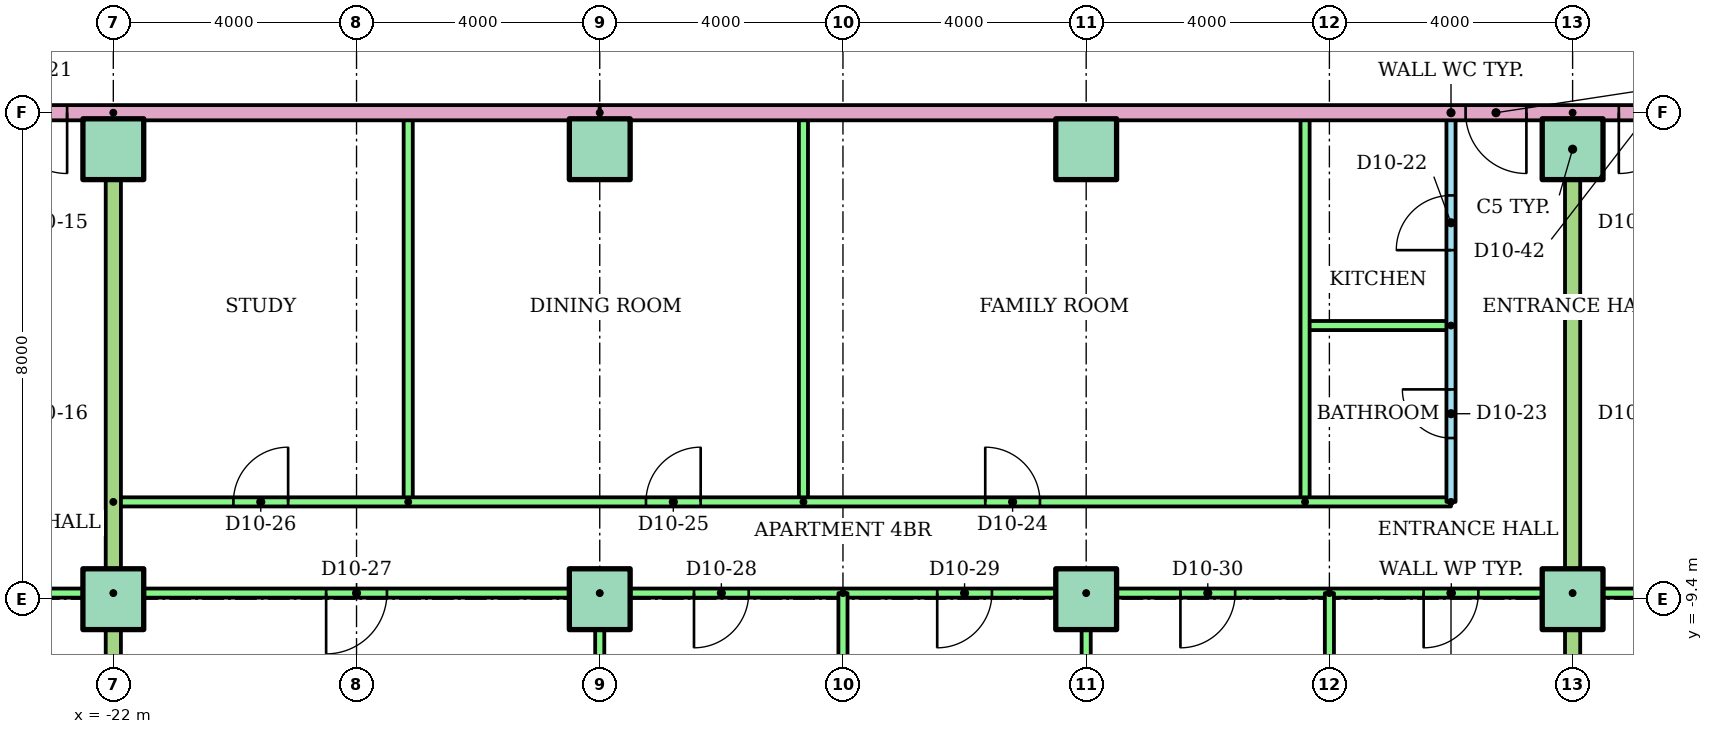
"""IFC4 building model, lengths in metres.
Left out: names, types, materials, properties, quantities, classifications, styles, units other than length and angle.
Written with IfcOpenShell. Run it as: python <this file> out.ifc"""

import sys

from ifc_helpers import new_model, si_unit, direction, frame, frame_2d, origin, origin_2d, place, context, subcontext, project, spatial, rectangle, extrude, element, fill, save


model = new_model("IFC4")
c1 = context("Model", 3, precision=1e-05, world=origin(), true_north=direction((0.0, 1.0)))
c2 = subcontext(c1, "Body", "Model", "MODEL_VIEW")
j1 = project(units=[si_unit("LENGTHUNIT", "METRE"), si_unit("PLANEANGLEUNIT", "RADIAN")], contexts=[c1])
p1 = place(None, origin())
s1 = spatial("IfcSite", under=j1, at=p1, CompositionType="ELEMENT")
p2 = place(p1, origin())
s2 = spatial("IfcBuilding", under=s1, at=p2, CompositionType="ELEMENT")
p3 = place(p2, frame((0.0, 0.0, 41.6)))
s3 = spatial("IfcBuildingStorey", under=s2, at=p3, CompositionType="ELEMENT", Elevation=41.6)
for number, where in (
    (1, (-22.0, -9.4, 0.0)),
    (2, (-14.0, -9.4, 0.0)),
    (3, (-6.0, -9.4, 0.0)),
    (4, (2.0, -9.4, 0.0)),
    (5, (-22.0, -2.0, 0.0)),
    (6, (-14.0, -2.0, 0.0)),
    (7, (-6.0, -2.0, 0.0)),
    (8, (2.0, -2.0, 0.0)),
):
    element("IfcColumn", number, at=place(p3, frame(where)), inside=s3, PredefinedType="COLUMN", context=c2, shape_type="SweptSolid", body=[
        extrude(rectangle(XDim=1.0, YDim=1.0, at=origin_2d()), origin(), (0.0, 0.0, 1.0), 3.2),
    ])
p4 = place(p3, frame((-22.0, -9.3, 0.0), z_axis=(0.0, 0.0, 1.0), x_axis=(-1.0, 0.0, 0.0)))
e9 = element("IfcWall", 9, at=p4, inside=s3, PredefinedType="PARTITIONING", context=c2, shape_type="SweptSolid", body=[
    extrude(rectangle(XDim=14.51, YDim=0.15, at=frame_2d((7.255, 0.0))), origin(), (0.0, 0.0, 1.0), 2.4),
])
p5 = place(p4, frame((11.6, 0.0, 0.0)))
e10 = element("IfcOpeningElement", 10, at=p5, cuts=e9, PredefinedType="OPENING", context=c2, shape_type="SweptSolid", body=[
    extrude(rectangle(XDim=0.9, YDim=2.1, at=frame_2d((0.45, 1.05))), frame((0.0, 0.085, 0.0), z_axis=(0.0, -1.0, 0.0), x_axis=(1.0, 0.0, 0.0)), (0.0, 0.0, 1.0), 0.17),
])
p6 = place(p4, frame((4.4, 0.0, 0.0)))
e11 = element("IfcOpeningElement", 11, at=p6, cuts=e9, PredefinedType="OPENING", context=c2, shape_type="SweptSolid", body=[
    extrude(rectangle(XDim=1.0, YDim=2.1, at=frame_2d((0.5, 1.05))), frame((0.0, 0.085, 0.0), z_axis=(0.0, -1.0, 0.0), x_axis=(1.0, 0.0, 0.0)), (0.0, 0.0, 1.0), 0.17),
])
p7 = place(p3, frame((0.0, -7.8, 0.0), z_axis=(0.0, 0.0, 1.0), x_axis=(0.0, 1.0, 0.0)))
e12 = element("IfcWall", 12, at=p7, inside=s3, PredefinedType="PARTITIONING", context=c2, shape_type="SweptSolid", body=[
    extrude(rectangle(XDim=6.4, YDim=0.15, at=frame_2d((3.2, 0.0))), origin(), (0.0, 0.0, 1.0), 2.4),
])
p8 = place(p7, frame((4.14, 0.0, 0.0)))
e13 = element("IfcOpeningElement", 13, at=p8, cuts=e12, PredefinedType="OPENING", context=c2, shape_type="SweptSolid", body=[
    extrude(rectangle(XDim=0.9, YDim=2.1, at=frame_2d((0.45, 1.05))), frame((0.0, 0.085, 0.0), z_axis=(0.0, -1.0, 0.0), x_axis=(1.0, 0.0, 0.0)), (0.0, 0.0, 1.0), 0.17),
])
p9 = place(p7, frame((1.05, 0.0, 0.0)))
e14 = element("IfcOpeningElement", 14, at=p9, cuts=e12, PredefinedType="OPENING", context=c2, shape_type="SweptSolid", body=[
    extrude(rectangle(XDim=0.8, YDim=2.1, at=frame_2d((0.4, 1.05))), frame((0.0, 0.085, 0.0), z_axis=(0.0, -1.0, 0.0), x_axis=(1.0, 0.0, 0.0)), (0.0, 0.0, 1.0), 0.17),
])
p10 = place(p3, frame((0.0, -4.9, 0.0), z_axis=(0.0, 0.0, 1.0), x_axis=(-1.0, 0.0, 0.0)))
e15 = element("IfcWall", 15, at=p10, inside=s3, PredefinedType="PARTITIONING", context=c2, shape_type="SweptSolid", body=[
    extrude(rectangle(XDim=2.4, YDim=0.15, at=frame_2d((1.2, 0.0))), origin(), (0.0, 0.0, 1.0), 2.4),
])
for number, where, z_axis, x_axis in (
    (16, (-2.4, -7.8, 0.0), (0.0, 0.0, 1.0), (0.0, 1.0, 0.0)),
    (17, (-10.65, -7.8, 0.0), (0.0, 0.0, 1.0), (0.0, 1.0, 0.0)),
    (18, (-17.15, -7.8, 0.0), (0.0, 0.0, 1.0), (0.0, 1.0, 0.0)),
):
    element("IfcWall", number, at=place(p3, frame(where, z_axis=z_axis, x_axis=x_axis)), inside=s3, PredefinedType="PARTITIONING", context=c2, shape_type="SweptSolid", body=[
        extrude(rectangle(XDim=6.4, YDim=0.15, at=frame_2d((3.2, 0.0))), origin(), (0.0, 0.0, 1.0), 2.4),
    ])
p11 = place(p3, frame((-22.0, -7.8, 0.0)))
e19 = element("IfcWall", 19, at=p11, inside=s3, PredefinedType="PARTITIONING", context=c2, shape_type="SweptSolid", body=[
    extrude(rectangle(XDim=22.0, YDim=0.15, at=frame_2d((11.0, 0.0))), origin(), (0.0, 0.0, 1.0), 2.4),
])
p12 = place(p11, frame((14.34, 0.0, 0.0)))
e20 = element("IfcOpeningElement", 20, at=p12, cuts=e19, PredefinedType="OPENING", context=c2, shape_type="SweptSolid", body=[
    extrude(rectangle(XDim=0.9, YDim=2.1, at=frame_2d((0.45, 1.05))), frame((0.0, 0.085, 0.0), z_axis=(0.0, -1.0, 0.0), x_axis=(1.0, 0.0, 0.0)), (0.0, 0.0, 1.0), 0.17),
])
p13 = place(p11, frame((8.76, 0.0, 0.0)))
e21 = element("IfcOpeningElement", 21, at=p13, cuts=e19, PredefinedType="OPENING", context=c2, shape_type="SweptSolid", body=[
    extrude(rectangle(XDim=0.9, YDim=2.1, at=frame_2d((0.45, 1.05))), frame((0.0, 0.085, 0.0), z_axis=(0.0, -1.0, 0.0), x_axis=(1.0, 0.0, 0.0)), (0.0, 0.0, 1.0), 0.17),
])
p14 = place(p11, frame((1.975, 0.0, 0.0)))
e22 = element("IfcOpeningElement", 22, at=p14, cuts=e19, PredefinedType="OPENING", context=c2, shape_type="SweptSolid", body=[
    extrude(rectangle(XDim=0.9, YDim=2.1, at=frame_2d((0.45, 1.05))), frame((0.0, 0.085, 0.0), z_axis=(0.0, -1.0, 0.0), x_axis=(1.0, 0.0, 0.0)), (0.0, 0.0, 1.0), 0.17),
])
p15 = place(p3, frame((2.0, -9.3, 0.0), z_axis=(0.0, 0.0, 1.0), x_axis=(-1.0, 0.0, 0.0)))
e23 = element("IfcWall", 23, at=p15, inside=s3, PredefinedType="PARTITIONING", context=c2, shape_type="SweptSolid", body=[
    extrude(rectangle(XDim=24.0, YDim=0.15, at=frame_2d((12.0, 0.0))), origin(), (0.0, 0.0, 1.0), 2.4),
])
p16 = place(p15, frame((19.5, 0.0, 0.0)))
e24 = element("IfcOpeningElement", 24, at=p16, cuts=e23, PredefinedType="OPENING", context=c2, shape_type="SweptSolid", body=[
    extrude(rectangle(XDim=1.0, YDim=2.1, at=frame_2d((0.5, 1.05))), frame((0.0, 0.085, 0.0), z_axis=(0.0, -1.0, 0.0), x_axis=(1.0, 0.0, 0.0)), (0.0, 0.0, 1.0), 0.17),
])
p17 = place(p15, frame((13.55, 0.0, 0.0)))
e25 = element("IfcOpeningElement", 25, at=p17, cuts=e23, PredefinedType="OPENING", context=c2, shape_type="SweptSolid", body=[
    extrude(rectangle(XDim=0.9, YDim=2.1, at=frame_2d((0.45, 1.05))), frame((0.0, 0.085, 0.0), z_axis=(0.0, -1.0, 0.0), x_axis=(1.0, 0.0, 0.0)), (0.0, 0.0, 1.0), 0.17),
])
p18 = place(p15, frame((9.55, 0.0, 0.0)))
e26 = element("IfcOpeningElement", 26, at=p18, cuts=e23, PredefinedType="OPENING", context=c2, shape_type="SweptSolid", body=[
    extrude(rectangle(XDim=0.9, YDim=2.1, at=frame_2d((0.45, 1.05))), frame((0.0, 0.085, 0.0), z_axis=(0.0, -1.0, 0.0), x_axis=(1.0, 0.0, 0.0)), (0.0, 0.0, 1.0), 0.17),
])
p19 = place(p15, frame((5.55, 0.0, 0.0)))
e27 = element("IfcOpeningElement", 27, at=p19, cuts=e23, PredefinedType="OPENING", context=c2, shape_type="SweptSolid", body=[
    extrude(rectangle(XDim=0.9, YDim=2.1, at=frame_2d((0.45, 1.05))), frame((0.0, 0.085, 0.0), z_axis=(0.0, -1.0, 0.0), x_axis=(1.0, 0.0, 0.0)), (0.0, 0.0, 1.0), 0.17),
])
p20 = place(p15, frame((1.55, 0.0, 0.0)))
e28 = element("IfcOpeningElement", 28, at=p20, cuts=e23, PredefinedType="OPENING", context=c2, shape_type="SweptSolid", body=[
    extrude(rectangle(XDim=0.9, YDim=2.1, at=frame_2d((0.45, 1.05))), frame((0.0, 0.085, 0.0), z_axis=(0.0, -1.0, 0.0), x_axis=(1.0, 0.0, 0.0)), (0.0, 0.0, 1.0), 0.17),
])
p21 = place(p3, frame((-14.0, -9.3, 0.0), z_axis=(0.0, 0.0, 1.0), x_axis=(0.0, -1.0, 0.0)))
e29 = element("IfcWall", 29, at=p21, inside=s3, PredefinedType="PARTITIONING", context=c2, shape_type="SweptSolid", body=[
    extrude(rectangle(XDim=6.81, YDim=0.15, at=frame_2d((3.405, 0.0))), origin(), (0.0, 0.0, 1.0), 2.4),
])
p22 = place(p3, frame((-10.0, -9.3, 0.0), z_axis=(0.0, 0.0, 1.0), x_axis=(0.0, -1.0, 0.0)))
e30 = element("IfcWall", 30, at=p22, inside=s3, PredefinedType="PARTITIONING", context=c2, shape_type="SweptSolid", body=[
    extrude(rectangle(XDim=6.821, YDim=0.15, at=frame_2d((3.411, 0.0))), origin(), (0.0, 0.0, 1.0), 2.4),
])
p23 = place(p3, frame((-6.0, -9.3, 0.0), z_axis=(0.0, 0.0, 1.0), x_axis=(0.0, -1.0, 0.0)))
e31 = element("IfcWall", 31, at=p23, inside=s3, PredefinedType="PARTITIONING", context=c2, shape_type="SweptSolid", body=[
    extrude(rectangle(XDim=6.81, YDim=0.15, at=frame_2d((3.405, 0.0))), origin(), (0.0, 0.0, 1.0), 2.4),
])
p24 = place(p3, frame((-2.0, -9.3, 0.0), z_axis=(0.0, 0.0, 1.0), x_axis=(0.0, -1.0, 0.0)))
e32 = element("IfcWall", 32, at=p24, inside=s3, PredefinedType="PARTITIONING", context=c2, shape_type="SweptSolid", body=[
    extrude(rectangle(XDim=6.821, YDim=0.15, at=frame_2d((3.411, 0.0))), origin(), (0.0, 0.0, 1.0), 2.4),
])
p25 = place(p3, frame((-22.0, -1.4, 0.0), z_axis=(0.0, 0.0, 1.0), x_axis=(0.0, -1.0, 0.0)))
e33 = element("IfcWall", 33, at=p25, inside=s3, PredefinedType="PARTITIONING", context=c2, shape_type="SweptSolid", body=[
    extrude(rectangle(XDim=14.71, YDim=0.25, at=frame_2d((7.355, 0.0))), origin(), (0.0, 0.0, 1.0), 2.4),
])
p26 = place(p3, frame((18.0, -9.3, 0.0), z_axis=(0.0, 0.0, 1.0), x_axis=(-1.0, 0.0, 0.0)))
e34 = element("IfcWall", 34, at=p26, inside=s3, PredefinedType="PARTITIONING", context=c2, shape_type="SweptSolid", body=[
    extrude(rectangle(XDim=16.0, YDim=0.15, at=frame_2d((8.0, 0.0))), origin(), (0.0, 0.0, 1.0), 2.4),
])
p27 = place(p26, frame((13.55, 0.0, 0.0)))
e35 = element("IfcOpeningElement", 35, at=p27, cuts=e34, PredefinedType="OPENING", context=c2, shape_type="SweptSolid", body=[
    extrude(rectangle(XDim=0.9, YDim=2.1, at=frame_2d((0.45, 1.05))), frame((0.0, 0.085, 0.0), z_axis=(0.0, -1.0, 0.0), x_axis=(1.0, 0.0, 0.0)), (0.0, 0.0, 1.0), 0.17),
])
p28 = place(p26, frame((9.55, 0.0, 0.0)))
e36 = element("IfcOpeningElement", 36, at=p28, cuts=e34, PredefinedType="OPENING", context=c2, shape_type="SweptSolid", body=[
    extrude(rectangle(XDim=0.9, YDim=2.1, at=frame_2d((0.45, 1.05))), frame((0.0, 0.085, 0.0), z_axis=(0.0, -1.0, 0.0), x_axis=(1.0, 0.0, 0.0)), (0.0, 0.0, 1.0), 0.17),
])
p29 = place(p26, frame((5.55, 0.0, 0.0)))
e37 = element("IfcOpeningElement", 37, at=p29, cuts=e34, PredefinedType="OPENING", context=c2, shape_type="SweptSolid", body=[
    extrude(rectangle(XDim=0.9, YDim=2.1, at=frame_2d((0.45, 1.05))), frame((0.0, 0.085, 0.0), z_axis=(0.0, -1.0, 0.0), x_axis=(1.0, 0.0, 0.0)), (0.0, 0.0, 1.0), 0.17),
])
p30 = place(p26, frame((1.5, 0.0, 0.0)))
e38 = element("IfcOpeningElement", 38, at=p30, cuts=e34, PredefinedType="OPENING", context=c2, shape_type="SweptSolid", body=[
    extrude(rectangle(XDim=1.0, YDim=2.1, at=frame_2d((0.5, 1.05))), frame((0.0, 0.085, 0.0), z_axis=(0.0, -1.0, 0.0), x_axis=(1.0, 0.0, 0.0)), (0.0, 0.0, 1.0), 0.17),
])
p31 = place(p3, frame((2.0, -1.4, 0.0), z_axis=(0.0, 0.0, 1.0), x_axis=(0.0, -1.0, 0.0)))
e39 = element("IfcWall", 39, at=p31, inside=s3, PredefinedType="PARTITIONING", context=c2, shape_type="SweptSolid", body=[
    extrude(rectangle(XDim=14.71, YDim=0.25, at=frame_2d((7.355, 0.0))), origin(), (0.0, 0.0, 1.0), 2.4),
])
p32 = place(p3, frame((-14.0, -1.4, 0.0), z_axis=(0.0, 0.0, 1.0), x_axis=(-1.0, 0.0, 0.0)))
e40 = element("IfcWall", 40, at=p32, inside=s3, PredefinedType="PARTITIONING", context=c2, shape_type="SweptSolid", body=[
    extrude(rectangle(XDim=15.0, YDim=0.25, at=frame_2d((7.5, 0.0))), origin(), (0.0, 0.0, 1.0), 2.4),
])
p33 = place(p32, frame((8.76, 0.0, 0.0)))
e41 = element("IfcOpeningElement", 41, at=p33, cuts=e40, PredefinedType="OPENING", context=c2, shape_type="SweptSolid", body=[
    extrude(rectangle(XDim=1.0, YDim=2.1, at=frame_2d((0.5, 1.05))), frame((0.0, 0.135, 0.0), z_axis=(0.0, -1.0, 0.0), x_axis=(1.0, 0.0, 0.0)), (0.0, 0.0, 1.0), 0.27),
])
p34 = place(p3, frame((14.0, -1.4, 0.0), z_axis=(0.0, 0.0, 1.0), x_axis=(-1.0, 0.0, 0.0)))
e42 = element("IfcWall", 42, at=p34, inside=s3, PredefinedType="PARTITIONING", context=c2, shape_type="SweptSolid", body=[
    extrude(rectangle(XDim=28.0, YDim=0.25, at=frame_2d((14.0, 0.0))), origin(), (0.0, 0.0, 1.0), 2.4),
])
p35 = place(p34, frame((12.76, 0.0, 0.0)))
e43 = element("IfcOpeningElement", 43, at=p35, cuts=e42, PredefinedType="OPENING", context=c2, shape_type="SweptSolid", body=[
    extrude(rectangle(XDim=1.0, YDim=2.1, at=frame_2d((0.5, 1.05))), frame((0.0, 0.135, 0.0), z_axis=(0.0, -1.0, 0.0), x_axis=(1.0, 0.0, 0.0)), (0.0, 0.0, 1.0), 0.27),
])
p36 = place(p34, frame((10.24, 0.0, 0.0)))
e44 = element("IfcOpeningElement", 44, at=p36, cuts=e42, PredefinedType="OPENING", context=c2, shape_type="SweptSolid", body=[
    extrude(rectangle(XDim=1.0, YDim=2.1, at=frame_2d((0.5, 1.05))), frame((0.0, 0.135, 0.0), z_axis=(0.0, -1.0, 0.0), x_axis=(1.0, 0.0, 0.0)), (0.0, 0.0, 1.0), 0.27),
])
p37 = place(p33, origin())
e45 = element("IfcDoor", 45, at=p37, inside=s3, OperationType="SINGLE_SWING_LEFT", PredefinedType="DOOR", context=c2, shape_type="SweptSolid", body=[
    extrude(rectangle(XDim=1.0, YDim=2.1, at=frame_2d((0.5, 1.05))), frame((0.0, 0.025, 0.0), z_axis=(0.0, -1.0, 0.0), x_axis=(1.0, 0.0, 0.0)), (0.0, 0.0, 1.0), 0.05),
])
fill(e41, e45)
p38 = place(p8, origin())
e46 = element("IfcDoor", 46, at=p38, inside=s3, OperationType="SINGLE_SWING_LEFT", PredefinedType="DOOR", context=c2, shape_type="SweptSolid", body=[
    extrude(rectangle(XDim=0.9, YDim=2.1, at=frame_2d((0.45, 1.05))), frame((0.0, 0.025, 0.0), z_axis=(0.0, -1.0, 0.0), x_axis=(1.0, 0.0, 0.0)), (0.0, 0.0, 1.0), 0.05),
])
fill(e13, e46)
p39 = place(p9, origin())
e47 = element("IfcDoor", 47, at=p39, inside=s3, OperationType="SINGLE_SWING_RIGHT", PredefinedType="DOOR", context=c2, shape_type="SweptSolid", body=[
    extrude(rectangle(XDim=0.8, YDim=2.1, at=frame_2d((0.4, 1.05))), frame((0.0, 0.025, 0.0), z_axis=(0.0, -1.0, 0.0), x_axis=(1.0, 0.0, 0.0)), (0.0, 0.0, 1.0), 0.05),
])
fill(e14, e47)
p40 = place(p12, origin())
e48 = element("IfcDoor", 48, at=p40, inside=s3, OperationType="SINGLE_SWING_LEFT", PredefinedType="DOOR", context=c2, shape_type="SweptSolid", body=[
    extrude(rectangle(XDim=0.9, YDim=2.1, at=frame_2d((0.45, 1.05))), frame((0.0, 0.025, 0.0), z_axis=(0.0, -1.0, 0.0), x_axis=(1.0, 0.0, 0.0)), (0.0, 0.0, 1.0), 0.05),
])
fill(e20, e48)
p41 = place(p13, origin())
e49 = element("IfcDoor", 49, at=p41, inside=s3, OperationType="SINGLE_SWING_RIGHT", PredefinedType="DOOR", context=c2, shape_type="SweptSolid", body=[
    extrude(rectangle(XDim=0.9, YDim=2.1, at=frame_2d((0.45, 1.05))), frame((0.0, 0.025, 0.0), z_axis=(0.0, -1.0, 0.0), x_axis=(1.0, 0.0, 0.0)), (0.0, 0.0, 1.0), 0.05),
])
fill(e21, e49)
p42 = place(p14, origin())
e50 = element("IfcDoor", 50, at=p42, inside=s3, OperationType="SINGLE_SWING_RIGHT", PredefinedType="DOOR", context=c2, shape_type="SweptSolid", body=[
    extrude(rectangle(XDim=0.9, YDim=2.1, at=frame_2d((0.45, 1.05))), frame((0.0, 0.025, 0.0), z_axis=(0.0, -1.0, 0.0), x_axis=(1.0, 0.0, 0.0)), (0.0, 0.0, 1.0), 0.05),
])
fill(e22, e50)
p43 = place(p16, origin())
e51 = element("IfcDoor", 51, at=p43, inside=s3, OperationType="SINGLE_SWING_RIGHT", PredefinedType="DOOR", context=c2, shape_type="SweptSolid", body=[
    extrude(rectangle(XDim=1.0, YDim=2.1, at=frame_2d((0.5, 1.05))), frame((0.0, 0.025, 0.0), z_axis=(0.0, -1.0, 0.0), x_axis=(1.0, 0.0, 0.0)), (0.0, 0.0, 1.0), 0.05),
])
fill(e24, e51)
p44 = place(p17, origin())
e52 = element("IfcDoor", 52, at=p44, inside=s3, OperationType="SINGLE_SWING_RIGHT", PredefinedType="DOOR", context=c2, shape_type="SweptSolid", body=[
    extrude(rectangle(XDim=0.9, YDim=2.1, at=frame_2d((0.45, 1.05))), frame((0.0, 0.025, 0.0), z_axis=(0.0, -1.0, 0.0), x_axis=(1.0, 0.0, 0.0)), (0.0, 0.0, 1.0), 0.05),
])
fill(e25, e52)
p45 = place(p18, origin())
e53 = element("IfcDoor", 53, at=p45, inside=s3, OperationType="SINGLE_SWING_RIGHT", PredefinedType="DOOR", context=c2, shape_type="SweptSolid", body=[
    extrude(rectangle(XDim=0.9, YDim=2.1, at=frame_2d((0.45, 1.05))), frame((0.0, 0.025, 0.0), z_axis=(0.0, -1.0, 0.0), x_axis=(1.0, 0.0, 0.0)), (0.0, 0.0, 1.0), 0.05),
])
fill(e26, e53)
p46 = place(p19, origin())
e54 = element("IfcDoor", 54, at=p46, inside=s3, OperationType="SINGLE_SWING_RIGHT", PredefinedType="DOOR", context=c2, shape_type="SweptSolid", body=[
    extrude(rectangle(XDim=0.9, YDim=2.1, at=frame_2d((0.45, 1.05))), frame((0.0, 0.025, 0.0), z_axis=(0.0, -1.0, 0.0), x_axis=(1.0, 0.0, 0.0)), (0.0, 0.0, 1.0), 0.05),
])
fill(e27, e54)
p47 = place(p20, origin())
e55 = element("IfcDoor", 55, at=p47, inside=s3, OperationType="SINGLE_SWING_RIGHT", PredefinedType="DOOR", context=c2, shape_type="SweptSolid", body=[
    extrude(rectangle(XDim=0.9, YDim=2.1, at=frame_2d((0.45, 1.05))), frame((0.0, 0.025, 0.0), z_axis=(0.0, -1.0, 0.0), x_axis=(1.0, 0.0, 0.0)), (0.0, 0.0, 1.0), 0.05),
])
fill(e28, e55)
p48 = place(p35, origin())
e56 = element("IfcDoor", 56, at=p48, inside=s3, OperationType="SINGLE_SWING_LEFT", PredefinedType="DOOR", context=c2, shape_type="SweptSolid", body=[
    extrude(rectangle(XDim=1.0, YDim=2.1, at=frame_2d((0.5, 1.05))), frame((0.0, 0.025, 0.0), z_axis=(0.0, -1.0, 0.0), x_axis=(1.0, 0.0, 0.0)), (0.0, 0.0, 1.0), 0.05),
])
fill(e43, e56)
p49 = place(p36, origin())
e57 = element("IfcDoor", 57, at=p49, inside=s3, OperationType="SINGLE_SWING_RIGHT", PredefinedType="DOOR", context=c2, shape_type="SweptSolid", body=[
    extrude(rectangle(XDim=1.0, YDim=2.1, at=frame_2d((0.5, 1.05))), frame((0.0, 0.025, 0.0), z_axis=(0.0, -1.0, 0.0), x_axis=(1.0, 0.0, 0.0)), (0.0, 0.0, 1.0), 0.05),
])
fill(e44, e57)
save(model, sys.argv[1])
